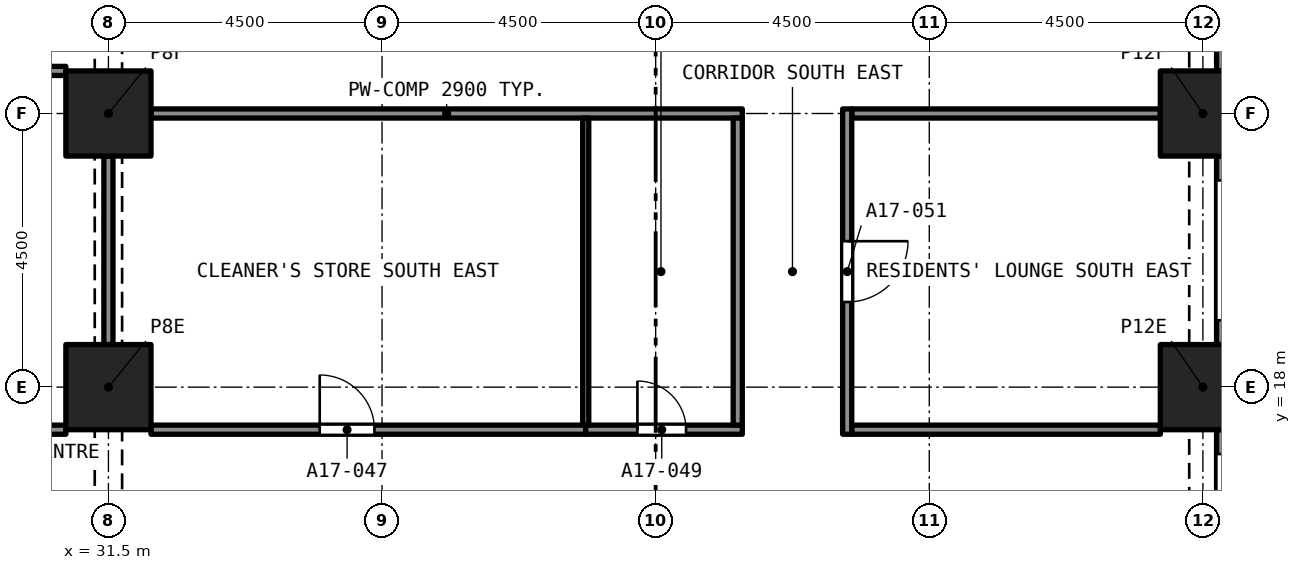
"""IFC4 building model, lengths in metres.
Left out: names, types, materials, properties, quantities, classifications, styles, units other than length and angle.
Written with IfcOpenShell. Run it as: python <this file> out.ifc"""

import sys

from ifc_helpers import new_model, si_unit, direction, frame, frame_2d, origin, origin_2d, place, context, subcontext, project, spatial, rectangle, extrude, element, fill, save


model = new_model("IFC4")
c1 = context("Model", 3, precision=1e-05, world=origin(), true_north=direction((0.0, 1.0)))
c2 = subcontext(c1, "Body", "Model", "MODEL_VIEW")
j1 = project(units=[si_unit("LENGTHUNIT", "METRE"), si_unit("PLANEANGLEUNIT", "RADIAN")], contexts=[c1])
p1 = place(None, origin())
s1 = spatial("IfcSite", under=j1, at=p1, CompositionType="ELEMENT")
p2 = place(p1, origin())
s2 = spatial("IfcBuilding", under=s1, at=p2, CompositionType="ELEMENT")
p3 = place(p2, frame((0.0, 0.0, 65.6)))
s3 = spatial("IfcBuildingStorey", under=s2, at=p3, CompositionType="ELEMENT", Elevation=65.6)
for number, where, z_axis, x_axis in (
    (1, (31.5, 18.0, 0.0), (0.0, 0.0, 1.0), (1.0, 0.0, 0.0)),
    (2, (49.5, 18.0, 0.0), (0.0, 0.0, 1.0), (1.0, 0.0, 0.0)),
    (3, (31.5, 22.5, 0.0), (0.0, 0.0, 1.0), (1.0, 0.0, 0.0)),
    (4, (49.5, 22.5, 0.0), (0.0, 0.0, 1.0), (1.0, 0.0, 0.0)),
):
    element("IfcColumn", number, at=place(p3, frame(where, z_axis=z_axis, x_axis=x_axis)), inside=s3, PredefinedType="COLUMN", context=c2, shape_type="SweptSolid", body=[
        extrude(rectangle(XDim=1.4, YDim=1.4, at=origin_2d()), origin(), (0.0, 0.0, 1.0), 3.2),
    ])
p4 = place(p3, frame((49.875, 17.3, 0.0), z_axis=(0.0, 0.0, 1.0), x_axis=(0.0, -1.0, 0.0)))
e5 = element("IfcWall", 5, at=p4, inside=s3, PredefinedType="SOLIDWALL", context=c2, shape_type="SweptSolid", body=[
    extrude(rectangle(XDim=3.1, YDim=0.3, at=frame_2d((1.55, 0.0))), origin(), (0.0, 0.0, 1.0), 3.2),
])
p5 = place(p4, frame((0.4, 0.0, 0.45)))
e6 = element("IfcOpeningElement", 6, at=p5, cuts=e5, PredefinedType="OPENING", context=c2, shape_type="SweptSolid", body=[
    extrude(rectangle(XDim=2.3, YDim=1.95, at=frame_2d((1.15, 0.975))), frame((0.0, 0.16, 0.0), z_axis=(0.0, -1.0, 0.0), x_axis=(1.0, 0.0, 0.0)), (0.0, 0.0, 1.0), 0.32),
])
p6 = place(p3, frame((49.875, 21.8, 0.0), z_axis=(0.0, 0.0, 1.0), x_axis=(0.0, -1.0, 0.0)))
e7 = element("IfcWall", 7, at=p6, inside=s3, PredefinedType="SOLIDWALL", context=c2, shape_type="SweptSolid", body=[
    extrude(rectangle(XDim=3.1, YDim=0.3, at=frame_2d((1.55, 0.0))), origin(), (0.0, 0.0, 1.0), 3.2),
])
p7 = place(p6, frame((0.4, 0.0, 0.45)))
e8 = element("IfcOpeningElement", 8, at=p7, cuts=e7, PredefinedType="OPENING", context=c2, shape_type="SweptSolid", body=[
    extrude(rectangle(XDim=2.3, YDim=1.95, at=frame_2d((1.15, 0.975))), frame((0.0, 0.16, 0.0), z_axis=(0.0, -1.0, 0.0), x_axis=(1.0, 0.0, 0.0)), (0.0, 0.0, 1.0), 0.32),
])
p8 = place(p3, frame((49.875, 26.3, 0.0), z_axis=(0.0, 0.0, 1.0), x_axis=(0.0, -1.0, 0.0)))
e9 = element("IfcWall", 9, at=p8, inside=s3, PredefinedType="SOLIDWALL", context=c2, shape_type="SweptSolid", body=[
    extrude(rectangle(XDim=3.1, YDim=0.3, at=frame_2d((1.55, 0.0))), origin(), (0.0, 0.0, 1.0), 3.2),
])
p9 = place(p8, frame((0.4, 0.0, 0.45)))
e10 = element("IfcOpeningElement", 10, at=p9, cuts=e9, PredefinedType="OPENING", context=c2, shape_type="SweptSolid", body=[
    extrude(rectangle(XDim=2.3, YDim=1.95, at=frame_2d((1.15, 0.975))), frame((0.0, 0.16, 0.0), z_axis=(0.0, -1.0, 0.0), x_axis=(1.0, 0.0, 0.0)), (0.0, 0.0, 1.0), 0.32),
])
p10 = place(p3, frame((25.725, 17.3, 0.0), z_axis=(0.0, 0.0, 1.0), x_axis=(1.0, 0.0, 0.0)))
e11 = element("IfcWall", 11, at=p10, inside=s3, PredefinedType="PARTITIONING", context=c2, shape_type="SweptSolid", body=[
    extrude(rectangle(XDim=5.075, YDim=0.15, at=frame_2d((2.538, 0.0))), origin(), (0.0, 0.0, 1.0), 2.75),
])
p11 = place(p3, frame((32.2, 17.3, 0.0), z_axis=(0.0, 0.0, 1.0), x_axis=(1.0, 0.0, 0.0)))
e12 = element("IfcWall", 12, at=p11, inside=s3, PredefinedType="PARTITIONING", context=c2, shape_type="SweptSolid", body=[
    extrude(rectangle(XDim=7.15, YDim=0.15, at=frame_2d((3.575, 0.0))), origin(), (0.0, 0.0, 1.0), 2.9),
])
p12 = place(p11, frame((2.775, 0.0, 0.0)))
e13 = element("IfcOpeningElement", 13, at=p12, cuts=e12, PredefinedType="OPENING", context=c2, shape_type="SweptSolid", body=[
    extrude(rectangle(XDim=0.9, YDim=2.1, at=frame_2d((0.45, 1.05))), frame((0.0, 0.085, 0.0), z_axis=(0.0, -1.0, 0.0), x_axis=(1.0, 0.0, 0.0)), (0.0, 0.0, 1.0), 0.17),
])
p13 = place(p3, frame((39.35, 17.3, 0.0), z_axis=(0.0, 0.0, 1.0), x_axis=(1.0, 0.0, 0.0)))
e14 = element("IfcWall", 14, at=p13, inside=s3, PredefinedType="PARTITIONING", context=c2, shape_type="SweptSolid", body=[
    extrude(rectangle(XDim=2.575, YDim=0.15, at=frame_2d((1.288, 0.0))), origin(), (0.0, 0.0, 1.0), 2.9),
])
p14 = place(p13, frame((0.85, 0.0, 0.0)))
e15 = element("IfcOpeningElement", 15, at=p14, cuts=e14, PredefinedType="OPENING", context=c2, shape_type="SweptSolid", body=[
    extrude(rectangle(XDim=0.8, YDim=2.1, at=frame_2d((0.4, 1.05))), frame((0.0, 0.085, 0.0), z_axis=(0.0, -1.0, 0.0), x_axis=(1.0, 0.0, 0.0)), (0.0, 0.0, 1.0), 0.17),
])
p15 = place(p3, frame((43.725, 17.3, 0.0), z_axis=(0.0, 0.0, 1.0), x_axis=(1.0, 0.0, 0.0)))
e16 = element("IfcWall", 16, at=p15, inside=s3, PredefinedType="PARTITIONING", context=c2, shape_type="SweptSolid", body=[
    extrude(rectangle(XDim=5.075, YDim=0.15, at=frame_2d((2.538, 0.0))), origin(), (0.0, 0.0, 1.0), 2.9),
])
p16 = place(p3, frame((25.725, 23.2, 0.0), z_axis=(0.0, 0.0, 1.0), x_axis=(1.0, 0.0, 0.0)))
e17 = element("IfcWall", 17, at=p16, inside=s3, PredefinedType="PARTITIONING", context=c2, shape_type="SweptSolid", body=[
    extrude(rectangle(XDim=5.075, YDim=0.15, at=frame_2d((2.538, 0.0))), origin(), (0.0, 0.0, 1.0), 2.75),
])
p17 = place(p3, frame((31.5, 18.7, 0.0), z_axis=(0.0, 0.0, 1.0), x_axis=(0.0, 1.0, 0.0)))
e18 = element("IfcWall", 18, at=p17, inside=s3, PredefinedType="PARTITIONING", context=c2, shape_type="SweptSolid", body=[
    extrude(rectangle(XDim=3.1, YDim=0.15, at=frame_2d((1.55, 0.0))), origin(), (0.0, 0.0, 1.0), 2.38),
])
p18 = place(p3, frame((32.2, 22.5, 0.0), z_axis=(0.0, 0.0, 1.0), x_axis=(1.0, 0.0, 0.0)))
e19 = element("IfcWall", 19, at=p18, inside=s3, PredefinedType="PARTITIONING", context=c2, shape_type="SweptSolid", body=[
    extrude(rectangle(XDim=9.725, YDim=0.15, at=frame_2d((4.863, 0.0))), origin(), (0.0, 0.0, 1.0), 2.9),
])
p19 = place(p3, frame((43.725, 22.5, 0.0), z_axis=(0.0, 0.0, 1.0), x_axis=(1.0, 0.0, 0.0)))
e20 = element("IfcWall", 20, at=p19, inside=s3, PredefinedType="PARTITIONING", context=c2, shape_type="SweptSolid", body=[
    extrude(rectangle(XDim=5.075, YDim=0.15, at=frame_2d((2.538, 0.0))), origin(), (0.0, 0.0, 1.0), 2.9),
])
p20 = place(p3, frame((41.85, 17.375, 0.0), z_axis=(0.0, 0.0, 1.0), x_axis=(0.0, 1.0, 0.0)))
e21 = element("IfcWall", 21, at=p20, inside=s3, PredefinedType="PARTITIONING", context=c2, shape_type="SweptSolid", body=[
    extrude(rectangle(XDim=5.05, YDim=0.15, at=frame_2d((2.525, 0.0))), origin(), (0.0, 0.0, 1.0), 2.9),
])
p21 = place(p3, frame((43.65, 22.575, 0.0), z_axis=(0.0, 0.0, 1.0), x_axis=(0.0, -1.0, 0.0)))
e22 = element("IfcWall", 22, at=p21, inside=s3, PredefinedType="PARTITIONING", context=c2, shape_type="SweptSolid", body=[
    extrude(rectangle(XDim=5.35, YDim=0.15, at=frame_2d((2.675, 0.0))), origin(), (0.0, 0.0, 1.0), 2.9),
])
p22 = place(p21, frame((2.175, 0.0, 0.0)))
e23 = element("IfcOpeningElement", 23, at=p22, cuts=e22, PredefinedType="OPENING", context=c2, shape_type="SweptSolid", body=[
    extrude(rectangle(XDim=1.0, YDim=2.1, at=frame_2d((0.5, 1.05))), frame((0.0, 0.085, 0.0), z_axis=(0.0, -1.0, 0.0), x_axis=(1.0, 0.0, 0.0)), (0.0, 0.0, 1.0), 0.17),
])
p23 = place(p3, frame((39.35, 17.375, 0.0), z_axis=(0.0, 0.0, 1.0), x_axis=(0.0, 1.0, 0.0)))
e24 = element("IfcWall", 24, at=p23, inside=s3, PredefinedType="PARTITIONING", context=c2, shape_type="SweptSolid", body=[
    extrude(rectangle(XDim=5.05, YDim=0.1, at=frame_2d((2.525, 0.0))), origin(), (0.0, 0.0, 1.0), 2.9),
])
p24 = place(p12, origin())
e25 = element("IfcDoor", 25, at=p24, inside=s3, OperationType="SINGLE_SWING_LEFT", PredefinedType="DOOR", context=c2, shape_type="SweptSolid", body=[
    extrude(rectangle(XDim=0.9, YDim=2.1, at=frame_2d((0.45, 1.05))), frame((0.0, 0.025, 0.0), z_axis=(0.0, -1.0, 0.0), x_axis=(1.0, 0.0, 0.0)), (0.0, 0.0, 1.0), 0.05),
])
fill(e13, e25)
p25 = place(p14, origin())
e26 = element("IfcDoor", 26, at=p25, inside=s3, OperationType="SINGLE_SWING_LEFT", PredefinedType="DOOR", context=c2, shape_type="SweptSolid", body=[
    extrude(rectangle(XDim=0.8, YDim=2.1, at=frame_2d((0.4, 1.05))), frame((0.0, 0.025, 0.0), z_axis=(0.0, -1.0, 0.0), x_axis=(1.0, 0.0, 0.0)), (0.0, 0.0, 1.0), 0.05),
])
fill(e15, e26)
p26 = place(p22, origin())
e27 = element("IfcDoor", 27, at=p26, inside=s3, OperationType="SINGLE_SWING_RIGHT", PredefinedType="DOOR", context=c2, shape_type="SweptSolid", body=[
    extrude(rectangle(XDim=1.0, YDim=2.1, at=frame_2d((0.5, 1.05))), frame((0.0, 0.025, 0.0), z_axis=(0.0, -1.0, 0.0), x_axis=(1.0, 0.0, 0.0)), (0.0, 0.0, 1.0), 0.05),
])
fill(e23, e27)
save(model, sys.argv[1])
